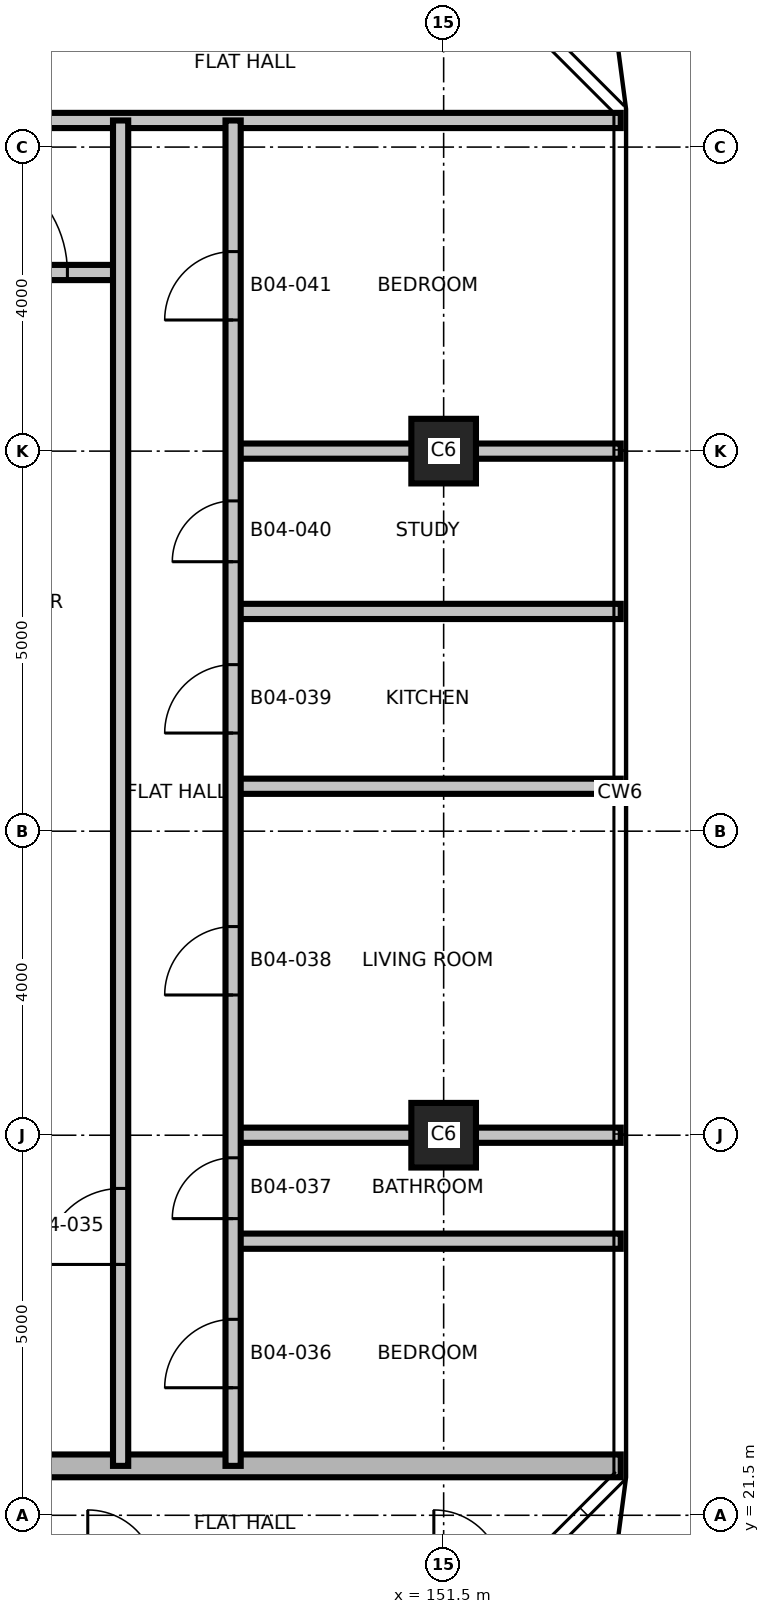
"""IFC4 building model, lengths in metres.
Left out: names, types, materials, properties, quantities, classifications, styles, units other than length and angle.
Written with IfcOpenShell. Run it as: python <this file> out.ifc"""

import sys

from ifc_helpers import new_model, si_unit, direction, frame, frame_2d, origin, origin_2d, place, context, subcontext, project, spatial, rectangle, extrude, element, fill, save


model = new_model("IFC4")
c1 = context("Model", 3, precision=1e-05, world=origin(), true_north=direction((0.0, 1.0)))
c2 = subcontext(c1, "Body", "Model", "MODEL_VIEW")
j1 = project(units=[si_unit("LENGTHUNIT", "METRE"), si_unit("PLANEANGLEUNIT", "RADIAN")], contexts=[c1])
p1 = place(None, origin())
s1 = spatial("IfcSite", under=j1, at=p1, CompositionType="ELEMENT")
p2 = place(p1, origin())
s2 = spatial("IfcBuilding", under=s1, at=p2, CompositionType="ELEMENT")
p3 = place(p2, frame((0.0, 0.0, 63.1)))
s3 = spatial("IfcBuildingStorey", under=s2, at=p3, CompositionType="ELEMENT", Elevation=63.1)
for number, where, z_axis, x_axis in (
    (1, (151.5, 26.5, 0.0), (0.0, 0.0, 1.0), (1.0, 0.0, 0.0)),
    (2, (151.5, 35.5, 0.0), (0.0, 0.0, 1.0), (1.0, 0.0, 0.0)),
):
    element("IfcColumn", number, at=place(p3, frame(where, z_axis=z_axis, x_axis=x_axis)), inside=s3, PredefinedType="COLUMN", context=c2, shape_type="SweptSolid", body=[
        extrude(rectangle(XDim=0.85, YDim=0.85, at=origin_2d()), origin(), (0.0, 0.0, 1.0), 3.7),
    ])
p4 = place(p3, frame((119.17, 22.15, 0.0), z_axis=(0.0, 0.0, 1.0), x_axis=(1.0, 0.0, 0.0)))
e3 = element("IfcWall", 3, at=p4, inside=s3, PredefinedType="SHEAR", context=c2, shape_type="SweptSolid", body=[
    extrude(rectangle(XDim=34.66, YDim=0.3, at=frame_2d((17.33, 0.0))), origin(), (0.0, 0.0, 1.0), 3.4),
])
p5 = place(p4, frame((23.58, 0.0, 0.0)))
e4 = element("IfcOpeningElement", 4, at=p5, cuts=e3, PredefinedType="OPENING", context=c2, shape_type="SweptSolid", body=[
    extrude(rectangle(XDim=1.0, YDim=2.1, at=frame_2d((0.5, 1.05))), frame((0.0, 0.16, 0.0), z_axis=(0.0, -1.0, 0.0), x_axis=(1.0, 0.0, 0.0)), (0.0, 0.0, 1.0), 0.32),
])
p6 = place(p4, frame((11.93, 0.0, 0.0)))
e5 = element("IfcOpeningElement", 5, at=p6, cuts=e3, PredefinedType="OPENING", context=c2, shape_type="SweptSolid", body=[
    extrude(rectangle(XDim=1.0, YDim=2.1, at=frame_2d((0.5, 1.05))), frame((0.0, 0.16, 0.0), z_axis=(0.0, -1.0, 0.0), x_axis=(1.0, 0.0, 0.0)), (0.0, 0.0, 1.0), 0.32),
])
p7 = place(p4, frame((25.48, 0.0, 0.0)))
e6 = element("IfcOpeningElement", 6, at=p7, cuts=e3, PredefinedType="OPENING", context=c2, shape_type="SweptSolid", body=[
    extrude(rectangle(XDim=1.0, YDim=2.1, at=frame_2d((0.5, 1.05))), frame((0.0, 0.16, 0.0), z_axis=(0.0, -1.0, 0.0), x_axis=(1.0, 0.0, 0.0)), (0.0, 0.0, 1.0), 0.32),
])
p8 = place(p4, frame((17.58, 0.0, 0.0)))
e7 = element("IfcOpeningElement", 7, at=p8, cuts=e3, PredefinedType="OPENING", context=c2, shape_type="SweptSolid", body=[
    extrude(rectangle(XDim=0.9, YDim=2.1, at=frame_2d((0.45, 1.05))), frame((0.0, 0.16, 0.0), z_axis=(0.0, -1.0, 0.0), x_axis=(1.0, 0.0, 0.0)), (0.0, 0.0, 1.0), 0.32),
])
for number, where, z_axis, x_axis in (
    (8, (148.73, 25.106, 0.0), (0.0, 0.0, 1.0), (1.0, 0.0, 0.0)),
    (9, (148.73, 26.5, 0.0), (0.0, 0.0, 1.0), (1.0, 0.0, 0.0)),
    (10, (148.73, 31.091, 0.0), (0.0, 0.0, 1.0), (1.0, 0.0, 0.0)),
    (11, (148.73, 33.391, 0.0), (0.0, 0.0, 1.0), (1.0, 0.0, 0.0)),
    (12, (148.73, 35.5, 0.0), (0.0, 0.0, 1.0), (1.0, 0.0, 0.0)),
):
    element("IfcWall", number, at=place(p3, frame(where, z_axis=z_axis, x_axis=x_axis)), inside=s3, PredefinedType="PARTITIONING", context=c2, shape_type="SweptSolid", body=[
        extrude(rectangle(XDim=5.1, YDim=0.2, at=frame_2d((2.55, 0.0))), origin(), (0.0, 0.0, 1.0), 3.4),
    ])
p9 = place(p3, frame((144.02, 37.85, 0.0), z_axis=(0.0, 0.0, 1.0), x_axis=(1.0, 0.0, 0.0)))
e13 = element("IfcWall", 13, at=p9, inside=s3, PredefinedType="PARTITIONING", context=c2, shape_type="SweptSolid", body=[
    extrude(rectangle(XDim=3.23, YDim=0.2, at=frame_2d((1.615, 0.0))), origin(), (0.0, 0.0, 1.0), 3.4),
])
p10 = place(p9, frame((1.03, 0.0, 0.0)))
e14 = element("IfcOpeningElement", 14, at=p10, cuts=e13, PredefinedType="OPENING", context=c2, shape_type="SweptSolid", body=[
    extrude(rectangle(XDim=1.5, YDim=2.1, at=frame_2d((0.75, 1.05))), frame((0.0, 0.11, 0.0), z_axis=(0.0, -1.0, 0.0), x_axis=(1.0, 0.0, 0.0)), (0.0, 0.0, 1.0), 0.22),
])
p11 = place(p3, frame((119.17, 39.85, 0.0), z_axis=(0.0, 0.0, 1.0), x_axis=(1.0, 0.0, 0.0)))
e15 = element("IfcWall", 15, at=p11, inside=s3, PredefinedType="PARTITIONING", context=c2, shape_type="SweptSolid", body=[
    extrude(rectangle(XDim=34.66, YDim=0.2, at=frame_2d((17.33, 0.0))), origin(), (0.0, 0.0, 1.0), 3.4),
])
p12 = place(p11, frame((11.93, 0.0, 0.0)))
e16 = element("IfcOpeningElement", 16, at=p12, cuts=e15, PredefinedType="OPENING", context=c2, shape_type="SweptSolid", body=[
    extrude(rectangle(XDim=1.0, YDim=2.1, at=frame_2d((0.5, 1.05))), frame((0.0, 0.11, 0.0), z_axis=(0.0, -1.0, 0.0), x_axis=(1.0, 0.0, 0.0)), (0.0, 0.0, 1.0), 0.22),
])
p13 = place(p11, frame((20.58, 0.0, 0.0)))
e17 = element("IfcOpeningElement", 17, at=p13, cuts=e15, PredefinedType="OPENING", context=c2, shape_type="SweptSolid", body=[
    extrude(rectangle(XDim=1.0, YDim=2.1, at=frame_2d((0.5, 1.05))), frame((0.0, 0.11, 0.0), z_axis=(0.0, -1.0, 0.0), x_axis=(1.0, 0.0, 0.0)), (0.0, 0.0, 1.0), 0.22),
])
p14 = place(p11, frame((25.48, 0.0, 0.0)))
e18 = element("IfcOpeningElement", 18, at=p14, cuts=e15, PredefinedType="OPENING", context=c2, shape_type="SweptSolid", body=[
    extrude(rectangle(XDim=1.0, YDim=2.1, at=frame_2d((0.5, 1.05))), frame((0.0, 0.11, 0.0), z_axis=(0.0, -1.0, 0.0), x_axis=(1.0, 0.0, 0.0)), (0.0, 0.0, 1.0), 0.22),
])
p15 = place(p3, frame((147.25, 22.15, 0.0), z_axis=(0.0, 0.0, 1.0), x_axis=(0.0, 1.0, 0.0)))
e19 = element("IfcWall", 19, at=p15, inside=s3, PredefinedType="PARTITIONING", context=c2, shape_type="SweptSolid", body=[
    extrude(rectangle(XDim=17.7, YDim=0.2, at=frame_2d((8.85, 0.0))), origin(), (0.0, 0.0, 1.0), 3.4),
])
p16 = place(p15, frame((2.65, 0.0, 0.0)))
e20 = element("IfcOpeningElement", 20, at=p16, cuts=e19, PredefinedType="OPENING", context=c2, shape_type="SweptSolid", body=[
    extrude(rectangle(XDim=1.0, YDim=2.1, at=frame_2d((0.5, 1.05))), frame((0.0, 0.11, 0.0), z_axis=(0.0, -1.0, 0.0), x_axis=(1.0, 0.0, 0.0)), (0.0, 0.0, 1.0), 0.22),
])
p17 = place(p3, frame((148.73, 22.15, 0.0), z_axis=(0.0, 0.0, 1.0), x_axis=(0.0, 1.0, 0.0)))
e21 = element("IfcWall", 21, at=p17, inside=s3, PredefinedType="PARTITIONING", context=c2, shape_type="SweptSolid", body=[
    extrude(rectangle(XDim=17.7, YDim=0.2, at=frame_2d((8.85, 0.0))), origin(), (0.0, 0.0, 1.0), 3.4),
])
p18 = place(p17, frame((1.028, 0.0, 0.0)))
e22 = element("IfcOpeningElement", 22, at=p18, cuts=e21, PredefinedType="OPENING", context=c2, shape_type="SweptSolid", body=[
    extrude(rectangle(XDim=0.9, YDim=2.1, at=frame_2d((0.45, 1.05))), frame((0.0, 0.11, 0.0), z_axis=(0.0, -1.0, 0.0), x_axis=(1.0, 0.0, 0.0)), (0.0, 0.0, 1.0), 0.22),
])
p19 = place(p17, frame((3.253, 0.0, 0.0)))
e23 = element("IfcOpeningElement", 23, at=p19, cuts=e21, PredefinedType="OPENING", context=c2, shape_type="SweptSolid", body=[
    extrude(rectangle(XDim=0.8, YDim=2.1, at=frame_2d((0.4, 1.05))), frame((0.0, 0.11, 0.0), z_axis=(0.0, -1.0, 0.0), x_axis=(1.0, 0.0, 0.0)), (0.0, 0.0, 1.0), 0.22),
])
p20 = place(p17, frame((6.195, 0.0, 0.0)))
e24 = element("IfcOpeningElement", 24, at=p20, cuts=e21, PredefinedType="OPENING", context=c2, shape_type="SweptSolid", body=[
    extrude(rectangle(XDim=0.9, YDim=2.1, at=frame_2d((0.45, 1.05))), frame((0.0, 0.11, 0.0), z_axis=(0.0, -1.0, 0.0), x_axis=(1.0, 0.0, 0.0)), (0.0, 0.0, 1.0), 0.22),
])
p21 = place(p17, frame((9.641, 0.0, 0.0)))
e25 = element("IfcOpeningElement", 25, at=p21, cuts=e21, PredefinedType="OPENING", context=c2, shape_type="SweptSolid", body=[
    extrude(rectangle(XDim=0.9, YDim=2.1, at=frame_2d((0.45, 1.05))), frame((0.0, 0.11, 0.0), z_axis=(0.0, -1.0, 0.0), x_axis=(1.0, 0.0, 0.0)), (0.0, 0.0, 1.0), 0.22),
])
p22 = place(p17, frame((11.895, 0.0, 0.0)))
e26 = element("IfcOpeningElement", 26, at=p22, cuts=e21, PredefinedType="OPENING", context=c2, shape_type="SweptSolid", body=[
    extrude(rectangle(XDim=0.8, YDim=2.1, at=frame_2d((0.4, 1.05))), frame((0.0, 0.11, 0.0), z_axis=(0.0, -1.0, 0.0), x_axis=(1.0, 0.0, 0.0)), (0.0, 0.0, 1.0), 0.22),
])
p23 = place(p17, frame((15.075, 0.0, 0.0)))
e27 = element("IfcOpeningElement", 27, at=p23, cuts=e21, PredefinedType="OPENING", context=c2, shape_type="SweptSolid", body=[
    extrude(rectangle(XDim=0.9, YDim=2.1, at=frame_2d((0.45, 1.05))), frame((0.0, 0.11, 0.0), z_axis=(0.0, -1.0, 0.0), x_axis=(1.0, 0.0, 0.0)), (0.0, 0.0, 1.0), 0.22),
])
p24 = place(p10, origin())
e28 = element("IfcDoor", 28, at=p24, inside=s3, OperationType="SINGLE_SWING_LEFT", PredefinedType="DOOR", context=c2, shape_type="SweptSolid", body=[
    extrude(rectangle(XDim=1.5, YDim=2.1, at=frame_2d((0.75, 1.05))), frame((0.0, 0.025, 0.0), z_axis=(0.0, -1.0, 0.0), x_axis=(1.0, 0.0, 0.0)), (0.0, 0.0, 1.0), 0.05),
])
fill(e14, e28)
p25 = place(p16, origin())
e29 = element("IfcDoor", 29, at=p25, inside=s3, OperationType="SINGLE_SWING_LEFT", PredefinedType="DOOR", context=c2, shape_type="SweptSolid", body=[
    extrude(rectangle(XDim=1.0, YDim=2.1, at=frame_2d((0.5, 1.05))), frame((0.0, 0.025, 0.0), z_axis=(0.0, -1.0, 0.0), x_axis=(1.0, 0.0, 0.0)), (0.0, 0.0, 1.0), 0.05),
])
fill(e20, e29)
p26 = place(p18, origin())
e30 = element("IfcDoor", 30, at=p26, inside=s3, OperationType="SINGLE_SWING_RIGHT", PredefinedType="DOOR", context=c2, shape_type="SweptSolid", body=[
    extrude(rectangle(XDim=0.9, YDim=2.1, at=frame_2d((0.45, 1.05))), frame((0.0, 0.025, 0.0), z_axis=(0.0, -1.0, 0.0), x_axis=(1.0, 0.0, 0.0)), (0.0, 0.0, 1.0), 0.05),
])
fill(e22, e30)
p27 = place(p19, origin())
e31 = element("IfcDoor", 31, at=p27, inside=s3, OperationType="SINGLE_SWING_LEFT", PredefinedType="DOOR", context=c2, shape_type="SweptSolid", body=[
    extrude(rectangle(XDim=0.8, YDim=2.1, at=frame_2d((0.4, 1.05))), frame((0.0, 0.025, 0.0), z_axis=(0.0, -1.0, 0.0), x_axis=(1.0, 0.0, 0.0)), (0.0, 0.0, 1.0), 0.05),
])
fill(e23, e31)
p28 = place(p20, origin())
e32 = element("IfcDoor", 32, at=p28, inside=s3, OperationType="SINGLE_SWING_RIGHT", PredefinedType="DOOR", context=c2, shape_type="SweptSolid", body=[
    extrude(rectangle(XDim=0.9, YDim=2.1, at=frame_2d((0.45, 1.05))), frame((0.0, 0.025, 0.0), z_axis=(0.0, -1.0, 0.0), x_axis=(1.0, 0.0, 0.0)), (0.0, 0.0, 1.0), 0.05),
])
fill(e24, e32)
p29 = place(p21, origin())
e33 = element("IfcDoor", 33, at=p29, inside=s3, OperationType="SINGLE_SWING_LEFT", PredefinedType="DOOR", context=c2, shape_type="SweptSolid", body=[
    extrude(rectangle(XDim=0.9, YDim=2.1, at=frame_2d((0.45, 1.05))), frame((0.0, 0.025, 0.0), z_axis=(0.0, -1.0, 0.0), x_axis=(1.0, 0.0, 0.0)), (0.0, 0.0, 1.0), 0.05),
])
fill(e25, e33)
p30 = place(p22, origin())
e34 = element("IfcDoor", 34, at=p30, inside=s3, OperationType="SINGLE_SWING_RIGHT", PredefinedType="DOOR", context=c2, shape_type="SweptSolid", body=[
    extrude(rectangle(XDim=0.8, YDim=2.1, at=frame_2d((0.4, 1.05))), frame((0.0, 0.025, 0.0), z_axis=(0.0, -1.0, 0.0), x_axis=(1.0, 0.0, 0.0)), (0.0, 0.0, 1.0), 0.05),
])
fill(e26, e34)
p31 = place(p23, origin())
e35 = element("IfcDoor", 35, at=p31, inside=s3, OperationType="SINGLE_SWING_LEFT", PredefinedType="DOOR", context=c2, shape_type="SweptSolid", body=[
    extrude(rectangle(XDim=0.9, YDim=2.1, at=frame_2d((0.45, 1.05))), frame((0.0, 0.025, 0.0), z_axis=(0.0, -1.0, 0.0), x_axis=(1.0, 0.0, 0.0)), (0.0, 0.0, 1.0), 0.05),
])
fill(e27, e35)
save(model, sys.argv[1])
